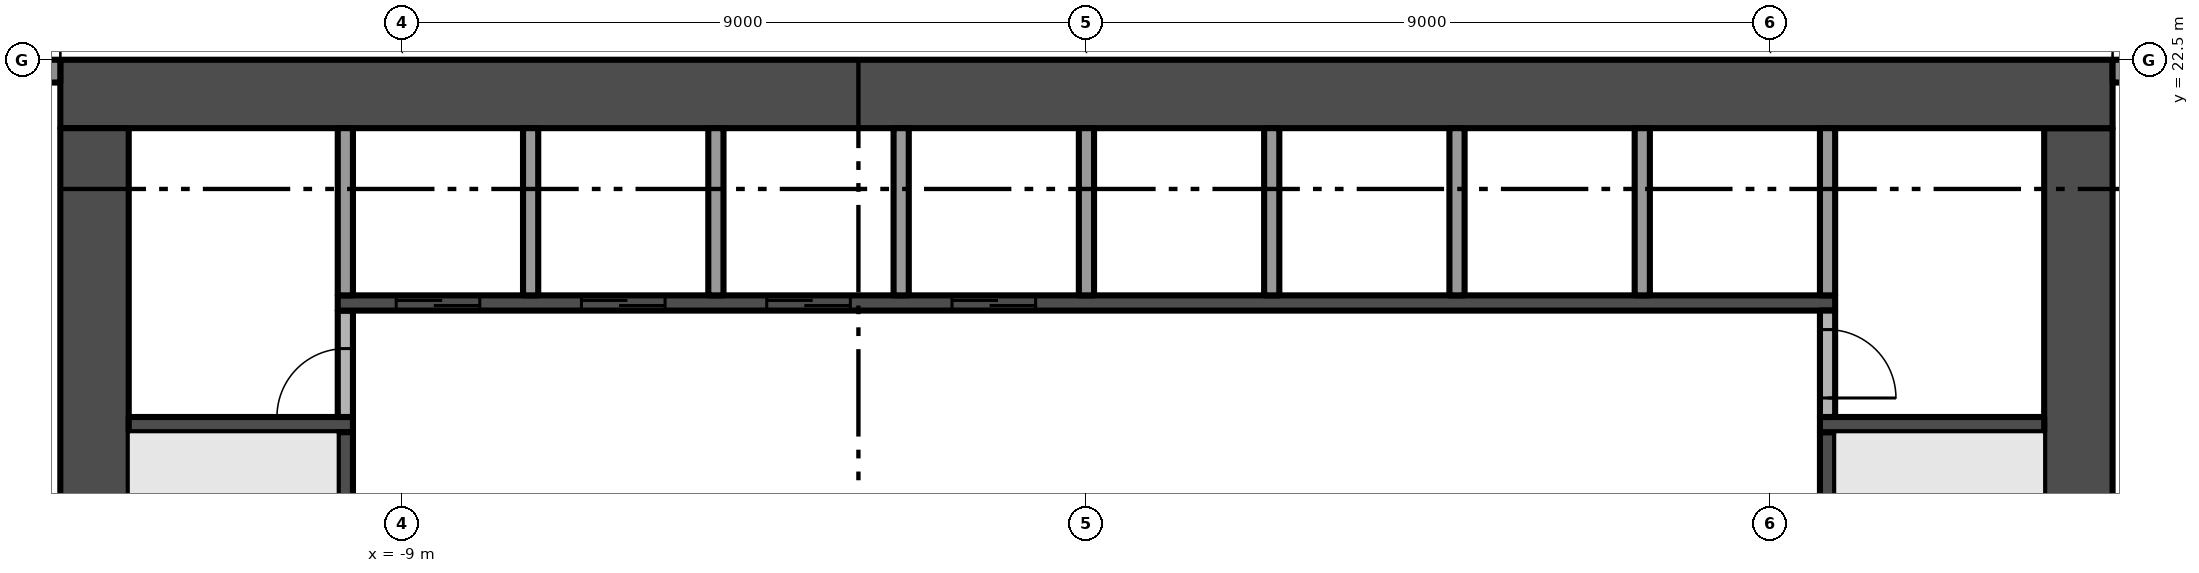
"""IFC4 building model, lengths in metres.
Left out: names, types, materials, properties, quantities, classifications, styles, units other than length and angle.
Written with IfcOpenShell. Run it as: python <this file> out.ifc"""

import sys

from ifc_helpers import new_model, si_unit, direction, frame, frame_2d, origin, place, context, subcontext, project, spatial, rectangle, extrude, element, fill, save


model = new_model("IFC4")
c1 = context("Model", 3, precision=1e-05, world=origin(), true_north=direction((0.0, 1.0)))
c2 = subcontext(c1, "Body", "Model", "MODEL_VIEW")
j1 = project(units=[si_unit("LENGTHUNIT", "METRE"), si_unit("PLANEANGLEUNIT", "RADIAN")], contexts=[c1])
p1 = place(None, origin())
s1 = spatial("IfcSite", under=j1, at=p1, CompositionType="ELEMENT")
p2 = place(p1, origin())
s2 = spatial("IfcBuilding", under=s1, at=p2, CompositionType="ELEMENT")
p3 = place(p2, frame((0.0, 0.0, 60.6)))
s3 = spatial("IfcBuildingStorey", under=s2, at=p3, CompositionType="ELEMENT", Elevation=60.6)
p4 = place(p3, frame((13.05, 5.4, -0.3), z_axis=(0.0, 0.0, 1.0), x_axis=(0.0, 1.0, 0.0)))
e1 = element("IfcWall", 1, at=p4, inside=s3, PredefinedType="SHEAR", context=c2, shape_type="SweptSolid", body=[
    extrude(rectangle(XDim=16.2, YDim=0.9, at=frame_2d((8.1, 0.0))), origin(), (0.0, 0.0, 1.0), 3.8),
])
p5 = place(p4, frame((6.0, 0.0, 0.3)))
e2 = element("IfcOpeningElement", 2, at=p5, cuts=e1, PredefinedType="OPENING", context=c2, shape_type="SweptSolid", body=[
    extrude(rectangle(XDim=1.2, YDim=2.2, at=frame_2d((0.6, 1.1))), frame((0.0, 0.46, 0.0), z_axis=(0.0, -1.0, 0.0), x_axis=(1.0, 0.0, 0.0)), (0.0, 0.0, 1.0), 0.92),
])
p6 = place(p3, frame((13.5, 22.05, -0.3), z_axis=(0.0, 0.0, 1.0), x_axis=(-1.0, 0.0, 0.0)))
e3 = element("IfcWall", 3, at=p6, inside=s3, PredefinedType="SHEAR", context=c2, shape_type="SweptSolid", body=[
    extrude(rectangle(XDim=27.0, YDim=0.9, at=frame_2d((13.5, 0.0))), origin(), (0.0, 0.0, 1.0), 3.8),
])
p7 = place(p3, frame((-13.05, 21.6, -0.3), z_axis=(0.0, 0.0, 1.0), x_axis=(0.0, -1.0, 0.0)))
e4 = element("IfcWall", 4, at=p7, inside=s3, PredefinedType="SHEAR", context=c2, shape_type="SweptSolid", body=[
    extrude(rectangle(XDim=16.2, YDim=0.9, at=frame_2d((8.1, 0.0))), origin(), (0.0, 0.0, 1.0), 3.8),
])
p8 = place(p7, frame((9.0, 0.0, 0.3)))
e5 = element("IfcOpeningElement", 5, at=p8, cuts=e4, PredefinedType="OPENING", context=c2, shape_type="SweptSolid", body=[
    extrude(rectangle(XDim=1.2, YDim=2.2, at=frame_2d((0.6, 1.1))), frame((0.0, 0.46, 0.0), z_axis=(0.0, -1.0, 0.0), x_axis=(1.0, 0.0, 0.0)), (0.0, 0.0, 1.0), 0.92),
])
p9 = place(p3, frame((13.5, 22.35, 0.0), z_axis=(0.0, 0.0, 1.0), x_axis=(1.0, 0.0, 0.0)))
e6 = element("IfcWall", 6, at=p9, inside=s3, PredefinedType="SOLIDWALL", context=c2, shape_type="SweptSolid", body=[
    extrude(rectangle(XDim=3.825, YDim=0.3, at=frame_2d((1.913, 0.0))), origin(), (0.0, 0.0, 1.0), 3.5),
])
p10 = place(p9, frame((2.8, 0.0, 0.45)))
e7 = element("IfcOpeningElement", 7, at=p10, cuts=e6, PredefinedType="OPENING", context=c2, shape_type="SweptSolid", body=[
    extrude(rectangle(XDim=0.7, YDim=2.65, at=frame_2d((0.35, 1.325))), frame((0.0, 0.16, 0.0), z_axis=(0.0, -1.0, 0.0), x_axis=(1.0, 0.0, 0.0)), (0.0, 0.0, 1.0), 0.32),
])
p11 = place(p9, frame((0.85, 0.0, 0.0)))
e8 = element("IfcOpeningElement", 8, at=p11, cuts=e6, PredefinedType="OPENING", context=c2, shape_type="SweptSolid", body=[
    extrude(rectangle(XDim=1.8, YDim=2.4, at=frame_2d((0.9, 1.2))), frame((0.0, 0.16, 0.0), z_axis=(0.0, -1.0, 0.0), x_axis=(1.0, 0.0, 0.0)), (0.0, 0.0, 1.0), 0.32),
])
p12 = place(p3, frame((-17.325, 22.35, 0.0), z_axis=(0.0, 0.0, 1.0), x_axis=(1.0, 0.0, 0.0)))
e9 = element("IfcWall", 9, at=p12, inside=s3, PredefinedType="SOLIDWALL", context=c2, shape_type="SweptSolid", body=[
    extrude(rectangle(XDim=3.825, YDim=0.3, at=frame_2d((1.913, 0.0))), origin(), (0.0, 0.0, 1.0), 3.5),
])
p13 = place(p12, frame((0.325, 0.0, 0.45)))
e10 = element("IfcOpeningElement", 10, at=p13, cuts=e9, PredefinedType="OPENING", context=c2, shape_type="SweptSolid", body=[
    extrude(rectangle(XDim=2.65, YDim=2.65, at=frame_2d((1.325, 1.325))), frame((0.0, 0.16, 0.0), z_axis=(0.0, -1.0, 0.0), x_axis=(1.0, 0.0, 0.0)), (0.0, 0.0, 1.0), 0.32),
])
p14 = place(p3, frame((-12.6, 17.7, 0.0), z_axis=(0.0, 0.0, 1.0), x_axis=(1.0, 0.0, 0.0)))
e11 = element("IfcWall", 11, at=p14, inside=s3, PredefinedType="SHEAR", context=c2, shape_type="SweptSolid", body=[
    extrude(rectangle(XDim=2.95, YDim=0.2, at=frame_2d((1.475, 0.0))), origin(), (0.0, 0.0, 1.0), 3.5),
])
p15 = place(p3, frame((-9.75, 16.1, 0.0), z_axis=(0.0, 0.0, 1.0), x_axis=(0.0, 1.0, 0.0)))
e12 = element("IfcWall", 12, at=p15, inside=s3, PredefinedType="SHEAR", context=c2, shape_type="SweptSolid", body=[
    extrude(rectangle(XDim=1.5, YDim=0.2, at=frame_2d((0.75, 0.0))), origin(), (0.0, 0.0, 1.0), 3.5),
])
p16 = place(p3, frame((-9.75, 17.8, 0.0), z_axis=(0.0, 0.0, 1.0), x_axis=(0.0, 1.0, 0.0)))
e13 = element("IfcWall", 13, at=p16, inside=s3, PredefinedType="PARTITIONING", context=c2, shape_type="SweptSolid", body=[
    extrude(rectangle(XDim=1.4, YDim=0.2, at=frame_2d((0.7, 0.0))), origin(), (0.0, 0.0, 1.0), 3.5),
])
p17 = place(p16, origin())
e14 = element("IfcOpeningElement", 14, at=p17, cuts=e13, PredefinedType="OPENING", context=c2, shape_type="SweptSolid", body=[
    extrude(rectangle(XDim=0.9, YDim=2.1, at=frame_2d((0.45, 1.05))), frame((0.0, 0.11, 0.0), z_axis=(0.0, -1.0, 0.0), x_axis=(1.0, 0.0, 0.0)), (0.0, 0.0, 1.0), 0.22),
])
p18 = place(p3, frame((-9.85, 19.3, 0.0), z_axis=(0.0, 0.0, 1.0), x_axis=(1.0, 0.0, 0.0)))
e15 = element("IfcWall", 15, at=p18, inside=s3, PredefinedType="SHEAR", context=c2, shape_type="SweptSolid", body=[
    extrude(rectangle(XDim=19.7, YDim=0.2, at=frame_2d((9.85, 0.0))), origin(), (0.0, 0.0, 1.0), 3.5),
])
p19 = place(p18, frame((0.769, 0.0, 0.0)))
e16 = element("IfcOpeningElement", 16, at=p19, cuts=e15, PredefinedType="OPENING", context=c2, shape_type="SweptSolid", body=[
    extrude(rectangle(XDim=1.1, YDim=2.1, at=frame_2d((0.55, 1.05))), frame((0.0, 0.11, 0.0), z_axis=(0.0, -1.0, 0.0), x_axis=(1.0, 0.0, 0.0)), (0.0, 0.0, 1.0), 0.22),
])
p20 = place(p18, frame((3.206, 0.0, 0.0)))
e17 = element("IfcOpeningElement", 17, at=p20, cuts=e15, PredefinedType="OPENING", context=c2, shape_type="SweptSolid", body=[
    extrude(rectangle(XDim=1.1, YDim=2.1, at=frame_2d((0.55, 1.05))), frame((0.0, 0.11, 0.0), z_axis=(0.0, -1.0, 0.0), x_axis=(1.0, 0.0, 0.0)), (0.0, 0.0, 1.0), 0.22),
])
p21 = place(p18, frame((5.644, 0.0, 0.0)))
e18 = element("IfcOpeningElement", 18, at=p21, cuts=e15, PredefinedType="OPENING", context=c2, shape_type="SweptSolid", body=[
    extrude(rectangle(XDim=1.1, YDim=2.1, at=frame_2d((0.55, 1.05))), frame((0.0, 0.11, 0.0), z_axis=(0.0, -1.0, 0.0), x_axis=(1.0, 0.0, 0.0)), (0.0, 0.0, 1.0), 0.22),
])
p22 = place(p18, frame((8.081, 0.0, 0.0)))
e19 = element("IfcOpeningElement", 19, at=p22, cuts=e15, PredefinedType="OPENING", context=c2, shape_type="SweptSolid", body=[
    extrude(rectangle(XDim=1.1, YDim=2.1, at=frame_2d((0.55, 1.05))), frame((0.0, 0.11, 0.0), z_axis=(0.0, -1.0, 0.0), x_axis=(1.0, 0.0, 0.0)), (0.0, 0.0, 1.0), 0.22),
])
for number, where, z_axis, x_axis in (
    (20, (-9.75, 19.4, 0.0), (0.0, 0.0, 1.0), (0.0, 1.0, 0.0)),
    (21, (-7.312, 19.4, 0.0), (0.0, 0.0, 1.0), (0.0, 1.0, 0.0)),
    (22, (-4.875, 19.4, 0.0), (0.0, 0.0, 1.0), (0.0, 1.0, 0.0)),
    (23, (-2.438, 19.4, 0.0), (0.0, 0.0, 1.0), (0.0, 1.0, 0.0)),
    (24, (0.0, 19.4, 0.0), (0.0, 0.0, 1.0), (0.0, 1.0, 0.0)),
    (25, (2.438, 19.4, 0.0), (0.0, 0.0, 1.0), (0.0, 1.0, 0.0)),
    (26, (4.875, 19.4, 0.0), (0.0, 0.0, 1.0), (0.0, 1.0, 0.0)),
    (27, (7.312, 19.4, 0.0), (0.0, 0.0, 1.0), (0.0, 1.0, 0.0)),
):
    element("IfcWall", number, at=place(p3, frame(where, z_axis=z_axis, x_axis=x_axis)), inside=s3, PredefinedType="PARTITIONING", context=c2, shape_type="SweptSolid", body=[
        extrude(rectangle(XDim=2.2, YDim=0.2, at=frame_2d((1.1, 0.0))), origin(), (0.0, 0.0, 1.0), 3.5),
    ])
p23 = place(p3, frame((9.75, 16.1, 0.0), z_axis=(0.0, 0.0, 1.0), x_axis=(0.0, 1.0, 0.0)))
e28 = element("IfcWall", 28, at=p23, inside=s3, PredefinedType="SHEAR", context=c2, shape_type="SweptSolid", body=[
    extrude(rectangle(XDim=1.5, YDim=0.2, at=frame_2d((0.75, 0.0))), origin(), (0.0, 0.0, 1.0), 3.5),
])
p24 = place(p3, frame((9.65, 17.7, 0.0), z_axis=(0.0, 0.0, 1.0), x_axis=(1.0, 0.0, 0.0)))
e29 = element("IfcWall", 29, at=p24, inside=s3, PredefinedType="SHEAR", context=c2, shape_type="SweptSolid", body=[
    extrude(rectangle(XDim=2.95, YDim=0.2, at=frame_2d((1.475, 0.0))), origin(), (0.0, 0.0, 1.0), 3.5),
])
p25 = place(p3, frame((9.75, 19.2, 0.0), z_axis=(0.0, 0.0, 1.0), x_axis=(0.0, -1.0, 0.0)))
e30 = element("IfcWall", 30, at=p25, inside=s3, PredefinedType="PARTITIONING", context=c2, shape_type="SweptSolid", body=[
    extrude(rectangle(XDim=1.4, YDim=0.2, at=frame_2d((0.7, 0.0))), origin(), (0.0, 0.0, 1.0), 3.5),
])
p26 = place(p25, frame((0.25, 0.0, 0.0)))
e31 = element("IfcOpeningElement", 31, at=p26, cuts=e30, PredefinedType="OPENING", context=c2, shape_type="SweptSolid", body=[
    extrude(rectangle(XDim=0.9, YDim=2.1, at=frame_2d((0.45, 1.05))), frame((0.0, 0.11, 0.0), z_axis=(0.0, -1.0, 0.0), x_axis=(1.0, 0.0, 0.0)), (0.0, 0.0, 1.0), 0.22),
])
p27 = place(p3, frame((9.75, 19.4, 0.0), z_axis=(0.0, 0.0, 1.0), x_axis=(0.0, 1.0, 0.0)))
e32 = element("IfcWall", 32, at=p27, inside=s3, PredefinedType="PARTITIONING", context=c2, shape_type="SweptSolid", body=[
    extrude(rectangle(XDim=2.2, YDim=0.2, at=frame_2d((1.1, 0.0))), origin(), (0.0, 0.0, 1.0), 3.5),
])
p28 = place(p19, origin())
e33 = element("IfcDoor", 33, at=p28, inside=s3, OperationType="SLIDING_TO_LEFT", PredefinedType="DOOR", context=c2, shape_type="SweptSolid", body=[
    extrude(rectangle(XDim=1.1, YDim=2.1, at=frame_2d((0.55, 1.05))), frame((0.0, 0.025, 0.0), z_axis=(0.0, -1.0, 0.0), x_axis=(1.0, 0.0, 0.0)), (0.0, 0.0, 1.0), 0.05),
])
fill(e16, e33)
p29 = place(p20, origin())
e34 = element("IfcDoor", 34, at=p29, inside=s3, OperationType="SLIDING_TO_LEFT", PredefinedType="DOOR", context=c2, shape_type="SweptSolid", body=[
    extrude(rectangle(XDim=1.1, YDim=2.1, at=frame_2d((0.55, 1.05))), frame((0.0, 0.025, 0.0), z_axis=(0.0, -1.0, 0.0), x_axis=(1.0, 0.0, 0.0)), (0.0, 0.0, 1.0), 0.05),
])
fill(e17, e34)
p30 = place(p21, origin())
e35 = element("IfcDoor", 35, at=p30, inside=s3, OperationType="SLIDING_TO_LEFT", PredefinedType="DOOR", context=c2, shape_type="SweptSolid", body=[
    extrude(rectangle(XDim=1.1, YDim=2.1, at=frame_2d((0.55, 1.05))), frame((0.0, 0.025, 0.0), z_axis=(0.0, -1.0, 0.0), x_axis=(1.0, 0.0, 0.0)), (0.0, 0.0, 1.0), 0.05),
])
fill(e18, e35)
p31 = place(p22, origin())
e36 = element("IfcDoor", 36, at=p31, inside=s3, OperationType="SLIDING_TO_LEFT", PredefinedType="DOOR", context=c2, shape_type="SweptSolid", body=[
    extrude(rectangle(XDim=1.1, YDim=2.1, at=frame_2d((0.55, 1.05))), frame((0.0, 0.025, 0.0), z_axis=(0.0, -1.0, 0.0), x_axis=(1.0, 0.0, 0.0)), (0.0, 0.0, 1.0), 0.05),
])
fill(e19, e36)
p32 = place(p17, origin())
e37 = element("IfcDoor", 37, at=p32, inside=s3, OperationType="SINGLE_SWING_LEFT", PredefinedType="DOOR", context=c2, shape_type="SweptSolid", body=[
    extrude(rectangle(XDim=0.9, YDim=2.1, at=frame_2d((0.45, 1.05))), frame((0.0, 0.025, 0.0), z_axis=(0.0, -1.0, 0.0), x_axis=(1.0, 0.0, 0.0)), (0.0, 0.0, 1.0), 0.05),
])
fill(e14, e37)
p33 = place(p26, origin())
e38 = element("IfcDoor", 38, at=p33, inside=s3, OperationType="SINGLE_SWING_RIGHT", PredefinedType="DOOR", context=c2, shape_type="SweptSolid", body=[
    extrude(rectangle(XDim=0.9, YDim=2.1, at=frame_2d((0.45, 1.05))), frame((0.0, 0.025, 0.0), z_axis=(0.0, -1.0, 0.0), x_axis=(1.0, 0.0, 0.0)), (0.0, 0.0, 1.0), 0.05),
])
fill(e31, e38)
save(model, sys.argv[1])
